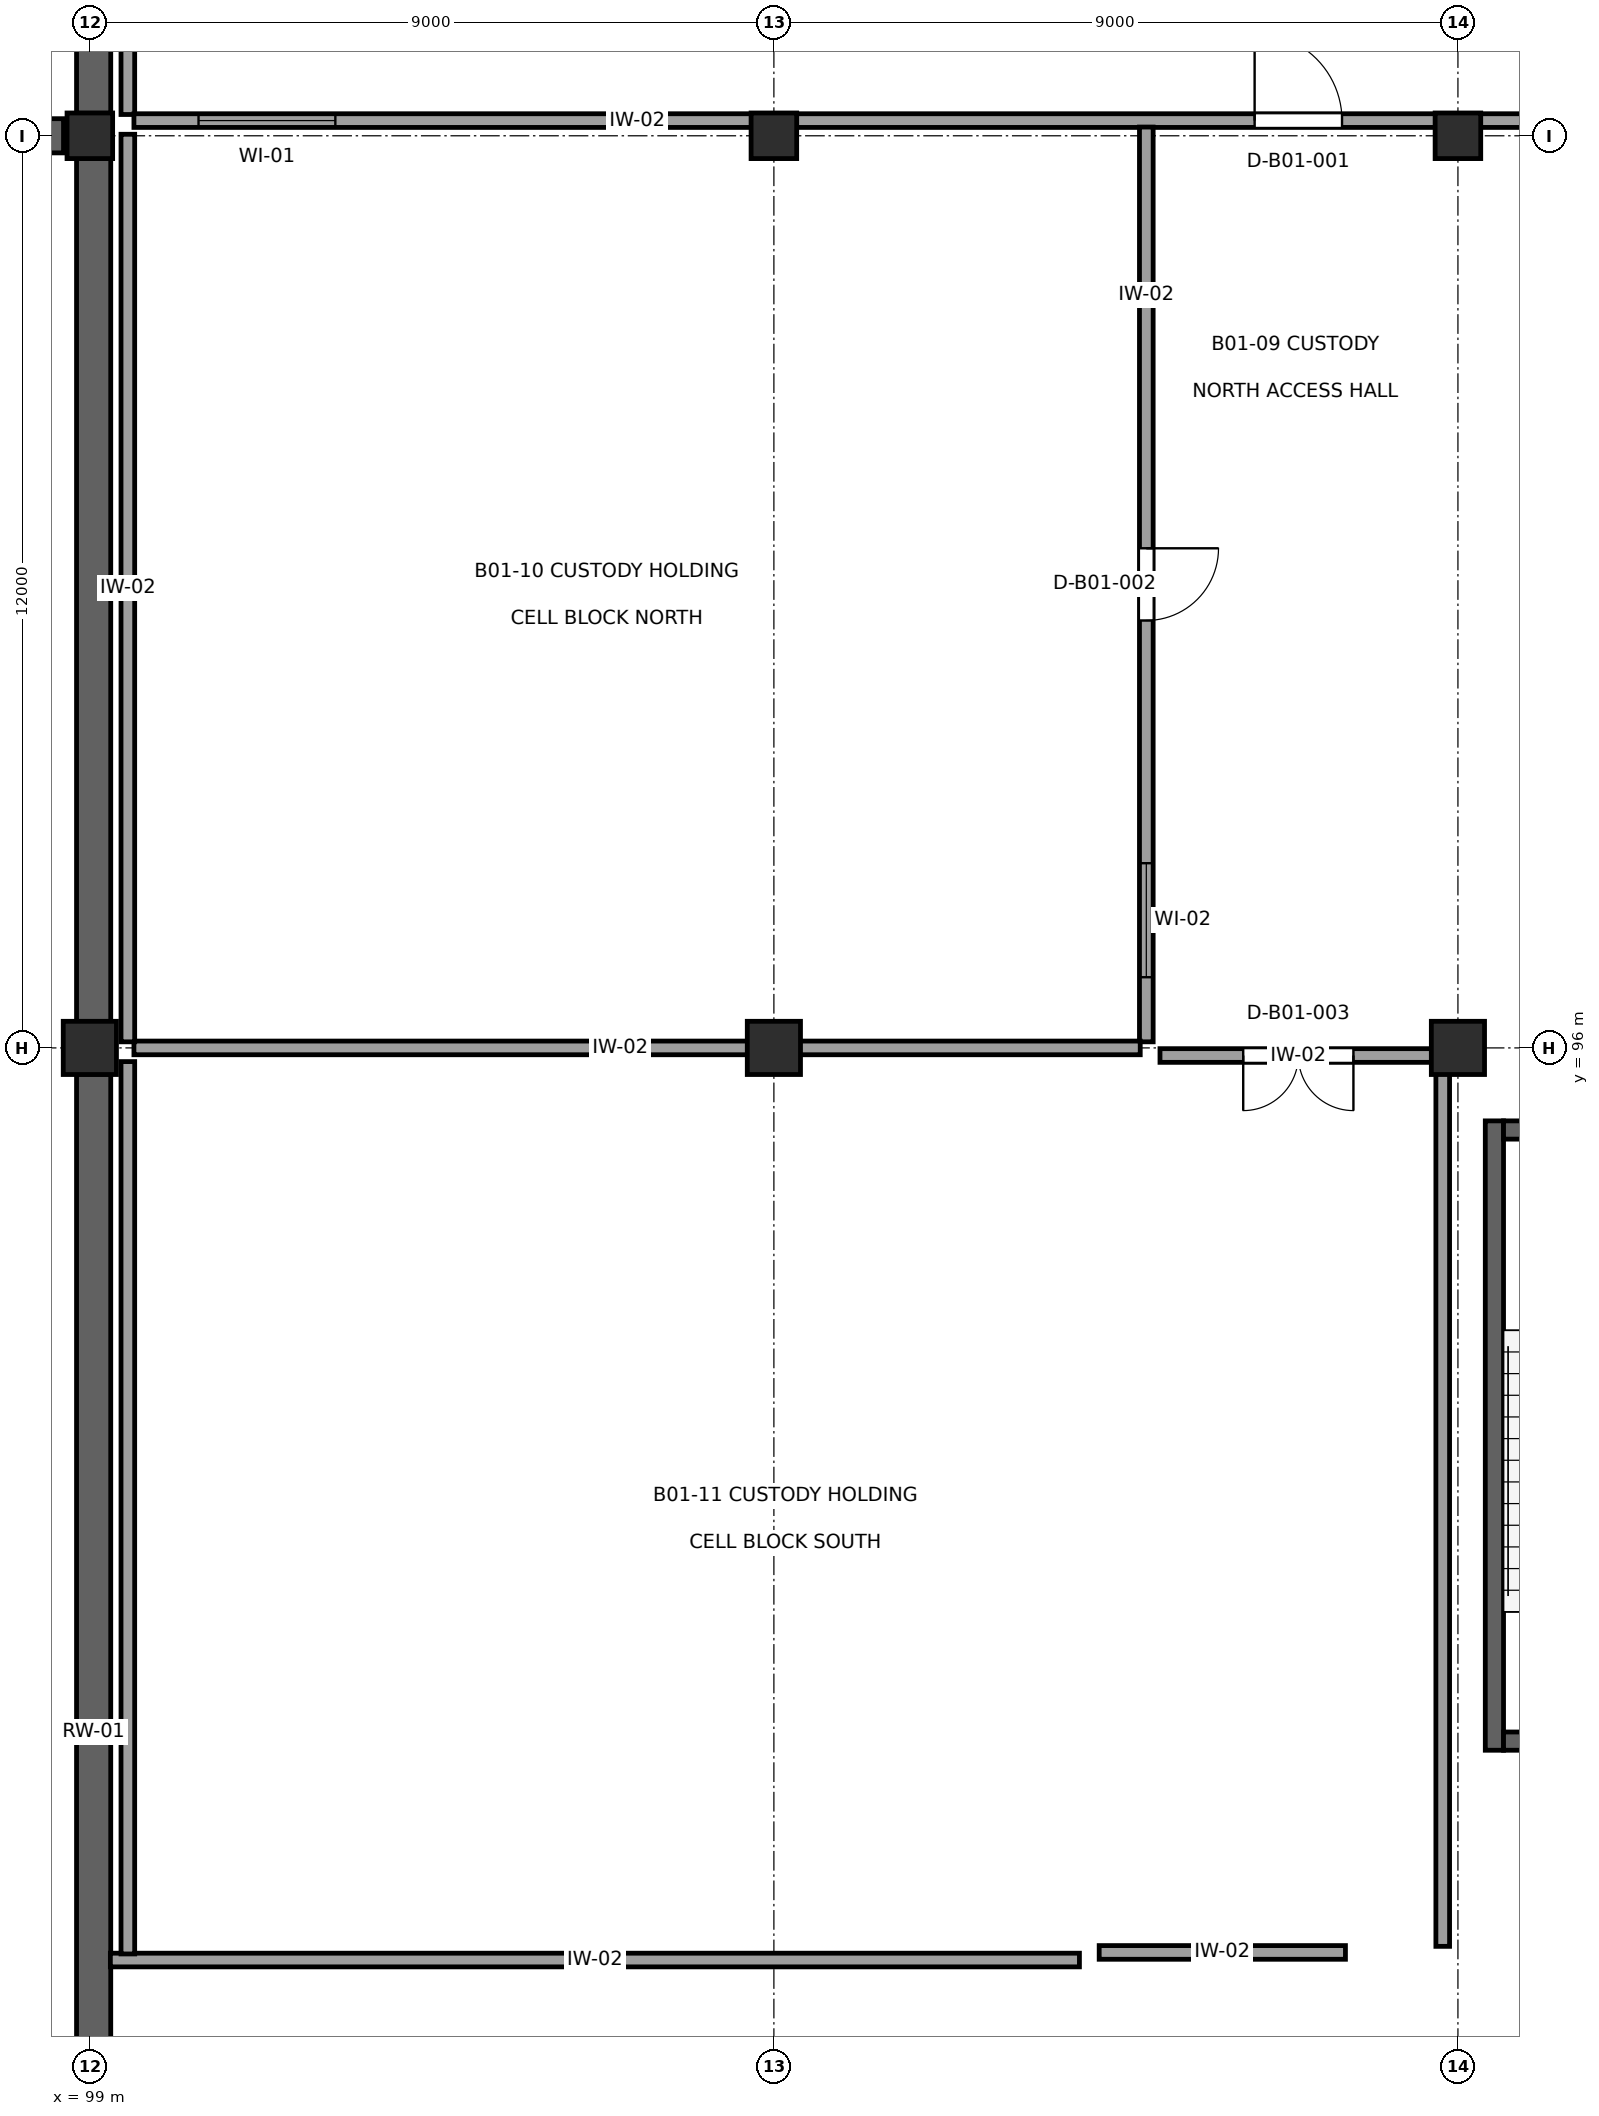
"""IFC4 building model, lengths in metres.
Left out: names, types, materials, properties, quantities, classifications, styles, units other than length and angle.
Written with IfcOpenShell. Run it as: python <this file> out.ifc"""

import sys

from ifc_helpers import new_model, si_unit, direction, frame, frame_2d, origin, origin_2d, place, context, subcontext, project, spatial, rectangle, extrude, element, fill, save


model = new_model("IFC4")
c1 = context("Model", 3, precision=1e-05, world=origin(), true_north=direction((0.0, 1.0)))
c2 = subcontext(c1, "Body", "Model", "MODEL_VIEW")
j1 = project(units=[si_unit("LENGTHUNIT", "METRE"), si_unit("PLANEANGLEUNIT", "RADIAN")], contexts=[c1])
p1 = place(None, origin())
s1 = spatial("IfcSite", under=j1, at=p1, CompositionType="ELEMENT")
p2 = place(p1, origin())
s2 = spatial("IfcBuilding", under=s1, at=p2, CompositionType="ELEMENT")
p3 = place(p2, frame((0.0, 0.0, -4.5)))
s3 = spatial("IfcBuildingStorey", under=s2, at=p3, CompositionType="ELEMENT", Elevation=-4.5)
p4 = place(p3, frame((99.0, 96.0, 0.0), z_axis=(0.0, 0.0, 1.0), x_axis=(1.0, 0.0, 0.0)))
e1 = element("IfcColumn", 1, at=p4, inside=s3, PredefinedType="COLUMN", context=c2, shape_type="SweptSolid", body=[
    extrude(rectangle(XDim=0.7, YDim=0.7, at=origin_2d()), origin(), (0.0, 0.0, 1.0), 4.5),
])
p5 = place(p3, frame((99.0, 108.0, 0.0), z_axis=(0.0, 0.0, 1.0), x_axis=(1.0, 0.0, 0.0)))
e2 = element("IfcColumn", 2, at=p5, inside=s3, PredefinedType="COLUMN", context=c2, shape_type="SweptSolid", body=[
    extrude(rectangle(XDim=0.6, YDim=0.6, at=origin_2d()), origin(), (0.0, 0.0, 1.0), 4.5),
])
p6 = place(p3, frame((108.0, 96.0, 0.0), z_axis=(0.0, 0.0, 1.0), x_axis=(1.0, 0.0, 0.0)))
e3 = element("IfcColumn", 3, at=p6, inside=s3, PredefinedType="COLUMN", context=c2, shape_type="SweptSolid", body=[
    extrude(rectangle(XDim=0.7, YDim=0.7, at=origin_2d()), origin(), (0.0, 0.0, 1.0), 4.5),
])
p7 = place(p3, frame((108.0, 108.0, 0.0), z_axis=(0.0, 0.0, 1.0), x_axis=(1.0, 0.0, 0.0)))
e4 = element("IfcColumn", 4, at=p7, inside=s3, PredefinedType="COLUMN", context=c2, shape_type="SweptSolid", body=[
    extrude(rectangle(XDim=0.6, YDim=0.6, at=origin_2d()), origin(), (0.0, 0.0, 1.0), 4.5),
])
p8 = place(p3, frame((117.0, 96.0, 0.0), z_axis=(0.0, 0.0, 1.0), x_axis=(1.0, 0.0, 0.0)))
e5 = element("IfcColumn", 5, at=p8, inside=s3, PredefinedType="COLUMN", context=c2, shape_type="SweptSolid", body=[
    extrude(rectangle(XDim=0.7, YDim=0.7, at=origin_2d()), origin(), (0.0, 0.0, 1.0), 4.5),
])
p9 = place(p3, frame((117.0, 108.0, 0.0), z_axis=(0.0, 0.0, 1.0), x_axis=(1.0, 0.0, 0.0)))
e6 = element("IfcColumn", 6, at=p9, inside=s3, PredefinedType="COLUMN", context=c2, shape_type="SweptSolid", body=[
    extrude(rectangle(XDim=0.6, YDim=0.6, at=origin_2d()), origin(), (0.0, 0.0, 1.0), 4.5),
])
p10 = place(p3, frame((99.05, 119.775, 0.0), z_axis=(0.0, 0.0, 1.0), x_axis=(0.0, -1.0, 0.0)))
e7 = element("IfcWall", 7, at=p10, inside=s3, PredefinedType="USERDEFINED", context=c2, shape_type="SweptSolid", body=[
    extrude(rectangle(XDim=11.479, YDim=0.45, at=frame_2d((5.74, 0.0))), origin(), (0.0, 0.0, 1.0), 4.32),
])
p11 = place(p3, frame((99.05, 107.704, 0.0), z_axis=(0.0, 0.0, 1.0), x_axis=(0.0, -1.0, 0.0)))
e8 = element("IfcWall", 8, at=p11, inside=s3, PredefinedType="USERDEFINED", context=c2, shape_type="SweptSolid", body=[
    extrude(rectangle(XDim=11.358, YDim=0.45, at=frame_2d((5.679, 0.0))), origin(), (0.0, 0.0, 1.0), 4.32),
])
p12 = place(p3, frame((99.05, 95.654, 0.0), z_axis=(0.0, 0.0, 1.0), x_axis=(0.0, -1.0, 0.0)))
e9 = element("IfcWall", 9, at=p12, inside=s3, PredefinedType="USERDEFINED", context=c2, shape_type="SweptSolid", body=[
    extrude(rectangle(XDim=17.308, YDim=0.45, at=frame_2d((8.654, 0.0))), origin(), (0.0, 0.0, 1.0), 4.32),
])
p13 = place(p3, frame((98.654, 108.0, 0.0), z_axis=(0.0, 0.0, 1.0), x_axis=(-1.0, 0.0, 0.0)))
e10 = element("IfcWall", 10, at=p13, inside=s3, PredefinedType="USERDEFINED", context=c2, shape_type="SweptSolid", body=[
    extrude(rectangle(XDim=8.358, YDim=0.45, at=frame_2d((4.179, 0.0))), origin(), (0.0, 0.0, 1.0), 4.32),
])
p14 = place(p3, frame((117.48, 86.76, 0.0), z_axis=(0.0, 0.0, 1.0), x_axis=(0.0, 1.0, 0.0)))
e11 = element("IfcWall", 11, at=p14, inside=s3, PredefinedType="SHEAR", context=c2, shape_type="SweptSolid", body=[
    extrude(rectangle(XDim=8.28, YDim=0.24, at=frame_2d((4.14, 0.0))), origin(), (0.0, 0.0, 1.0), 4.31),
])
for number, where, z_axis, x_axis in (
    (12, (117.6, 86.88, 0.0), (0.0, 0.0, 1.0), (1.0, 0.0, 0.0)),
    (13, (117.6, 94.92, 0.0), (0.0, 0.0, 1.0), (1.0, 0.0, 0.0)),
):
    element("IfcWall", number, at=place(p3, frame(where, z_axis=z_axis, x_axis=x_axis)), inside=s3, PredefinedType="SHEAR", context=c2, shape_type="SweptSolid", body=[
        extrude(rectangle(XDim=3.7, YDim=0.24, at=frame_2d((1.85, 0.0))), origin(), (0.0, 0.0, 1.0), 4.31),
    ])
p15 = place(p3, frame((99.5, 108.28, 0.0), z_axis=(0.0, 0.0, 1.0), x_axis=(0.0, 1.0, 0.0)))
e14 = element("IfcWall", 14, at=p15, inside=s3, PredefinedType="PARTITIONING", context=c2, shape_type="SweptSolid", body=[
    extrude(rectangle(XDim=11.5, YDim=0.18, at=frame_2d((5.75, 0.0))), origin(), (0.0, 0.0, 1.0), 4.14),
])
p16 = place(p3, frame((125.42, 108.2, 0.0), z_axis=(0.0, 0.0, 1.0), x_axis=(-1.0, 0.0, 0.0)))
e15 = element("IfcWall", 15, at=p16, inside=s3, PredefinedType="PARTITIONING", context=c2, shape_type="SweptSolid", body=[
    extrude(rectangle(XDim=25.84, YDim=0.18, at=frame_2d((12.92, 0.0))), origin(), (0.0, 0.0, 1.0), 3.645),
])
p17 = place(p16, frame((9.945, 0.0, 0.0)))
e16 = element("IfcOpeningElement", 16, at=p17, cuts=e15, PredefinedType="OPENING", context=c2, shape_type="SweptSolid", body=[
    extrude(rectangle(XDim=1.15, YDim=2.15, at=frame_2d((0.575, 1.075))), frame((0.0, 0.105, 0.0), z_axis=(0.0, -1.0, 0.0), x_axis=(1.0, 0.0, 0.0)), (0.0, 0.0, 1.0), 0.21),
])
p18 = place(p16, frame((23.19, 0.0, 1.05)))
e17 = element("IfcOpeningElement", 17, at=p18, cuts=e15, PredefinedType="OPENING", context=c2, shape_type="SweptSolid", body=[
    extrude(rectangle(XDim=1.8, YDim=1.1, at=frame_2d((0.9, 0.55))), frame((0.0, 0.105, 0.0), z_axis=(0.0, -1.0, 0.0), x_axis=(1.0, 0.0, 0.0)), (0.0, 0.0, 1.0), 0.21),
])
p19 = place(p3, frame((112.9, 108.115, 0.0), z_axis=(0.0, 0.0, 1.0), x_axis=(0.0, -1.0, 0.0)))
e18 = element("IfcWall", 18, at=p19, inside=s3, PredefinedType="PARTITIONING", context=c2, shape_type="SweptSolid", body=[
    extrude(rectangle(XDim=12.035, YDim=0.18, at=frame_2d((6.018, 0.0))), origin(), (0.0, 0.0, 1.0), 4.14),
])
p20 = place(p19, frame((5.542, 0.0, 0.0)))
e19 = element("IfcOpeningElement", 19, at=p20, cuts=e18, PredefinedType="OPENING", context=c2, shape_type="SweptSolid", body=[
    extrude(rectangle(XDim=0.95, YDim=2.1, at=frame_2d((0.475, 1.05))), frame((0.0, 0.105, 0.0), z_axis=(0.0, -1.0, 0.0), x_axis=(1.0, 0.0, 0.0)), (0.0, 0.0, 1.0), 0.21),
])
p21 = place(p19, frame((9.685, 0.0, 1.05)))
e20 = element("IfcOpeningElement", 20, at=p21, cuts=e18, PredefinedType="OPENING", context=c2, shape_type="SweptSolid", body=[
    extrude(rectangle(XDim=1.5, YDim=1.1, at=frame_2d((0.75, 0.55))), frame((0.0, 0.105, 0.0), z_axis=(0.0, -1.0, 0.0), x_axis=(1.0, 0.0, 0.0)), (0.0, 0.0, 1.0), 0.21),
])
p22 = place(p3, frame((112.82, 96.0, 0.0), z_axis=(0.0, 0.0, 1.0), x_axis=(-1.0, 0.0, 0.0)))
e21 = element("IfcWall", 21, at=p22, inside=s3, PredefinedType="PARTITIONING", context=c2, shape_type="SweptSolid", body=[
    extrude(rectangle(XDim=13.24, YDim=0.18, at=frame_2d((6.62, 0.0))), origin(), (0.0, 0.0, 1.0), 3.755),
])
p23 = place(p3, frame((99.5, 96.08, 0.0), z_axis=(0.0, 0.0, 1.0), x_axis=(0.0, 1.0, 0.0)))
e22 = element("IfcWall", 22, at=p23, inside=s3, PredefinedType="PARTITIONING", context=c2, shape_type="SweptSolid", body=[
    extrude(rectangle(XDim=11.94, YDim=0.18, at=frame_2d((5.97, 0.0))), origin(), (0.0, 0.0, 1.0), 3.835),
])
p24 = place(p3, frame((115.52, 84.1, 0.0), z_axis=(0.0, 0.0, 1.0), x_axis=(-1.0, 0.0, 0.0)))
e23 = element("IfcWall", 23, at=p24, inside=s3, PredefinedType="PARTITIONING", context=c2, shape_type="SweptSolid", body=[
    extrude(rectangle(XDim=3.24, YDim=0.18, at=frame_2d((1.62, 0.0))), origin(), (0.0, 0.0, 1.0), 4.14),
])
p25 = place(p3, frame((112.02, 84.0, 0.0), z_axis=(0.0, 0.0, 1.0), x_axis=(-1.0, 0.0, 0.0)))
e24 = element("IfcWall", 24, at=p25, inside=s3, PredefinedType="PARTITIONING", context=c2, shape_type="SweptSolid", body=[
    extrude(rectangle(XDim=12.75, YDim=0.18, at=frame_2d((6.375, 0.0))), origin(), (0.0, 0.0, 1.0), 4.14),
])
p26 = place(p3, frame((99.5, 84.08, 0.0), z_axis=(0.0, 0.0, 1.0), x_axis=(0.0, 1.0, 0.0)))
e25 = element("IfcWall", 25, at=p26, inside=s3, PredefinedType="PARTITIONING", context=c2, shape_type="SweptSolid", body=[
    extrude(rectangle(XDim=11.74, YDim=0.18, at=frame_2d((5.87, 0.0))), origin(), (0.0, 0.0, 1.0), 3.715),
])
p27 = place(p3, frame((113.08, 95.9, 0.0), z_axis=(0.0, 0.0, 1.0), x_axis=(1.0, 0.0, 0.0)))
e26 = element("IfcWall", 26, at=p27, inside=s3, PredefinedType="PARTITIONING", context=c2, shape_type="SweptSolid", body=[
    extrude(rectangle(XDim=3.64, YDim=0.18, at=frame_2d((1.82, 0.0))), origin(), (0.0, 0.0, 1.0), 3.755),
])
p28 = place(p27, frame((1.095, 0.0, 0.0)))
e27 = element("IfcOpeningElement", 27, at=p28, cuts=e26, PredefinedType="OPENING", context=c2, shape_type="SweptSolid", body=[
    extrude(rectangle(XDim=1.45, YDim=2.3, at=frame_2d((0.725, 1.15))), frame((0.0, 0.105, 0.0), z_axis=(0.0, -1.0, 0.0), x_axis=(1.0, 0.0, 0.0)), (0.0, 0.0, 1.0), 0.21),
])
p29 = place(p3, frame((116.8, 95.82, 0.0), z_axis=(0.0, 0.0, 1.0), x_axis=(0.0, -1.0, 0.0)))
e28 = element("IfcWall", 28, at=p29, inside=s3, PredefinedType="PARTITIONING", context=c2, shape_type="SweptSolid", body=[
    extrude(rectangle(XDim=11.64, YDim=0.18, at=frame_2d((5.82, 0.0))), origin(), (0.0, 0.0, 1.0), 3.405),
])
p30 = place(p17, frame((1.15, 0.0, 0.0), z_axis=(0.0, 0.0, 1.0), x_axis=(-1.0, 0.0, 0.0)))
e29 = element("IfcDoor", 29, at=p30, inside=s3, OperationType="SINGLE_SWING_RIGHT", PredefinedType="DOOR", context=c2, shape_type="SweptSolid", body=[
    extrude(rectangle(XDim=1.15, YDim=2.15, at=frame_2d((0.575, 1.075))), frame((0.0, 0.025, 0.0), z_axis=(0.0, -1.0, 0.0), x_axis=(1.0, 0.0, 0.0)), (0.0, 0.0, 1.0), 0.05),
])
fill(e16, e29)
p31 = place(p18, origin())
e30 = element("IfcWindow", 30, at=p31, inside=s3, PartitioningType="SINGLE_PANEL", PredefinedType="WINDOW", context=c2, shape_type="SweptSolid", body=[
    extrude(rectangle(XDim=1.8, YDim=1.1, at=frame_2d((0.9, 0.55))), frame((0.0, 0.03, 0.0), z_axis=(0.0, -1.0, 0.0), x_axis=(1.0, 0.0, 0.0)), (0.0, 0.0, 1.0), 0.06),
])
fill(e17, e30)
p32 = place(p20, origin())
e31 = element("IfcDoor", 31, at=p32, inside=s3, OperationType="SINGLE_SWING_LEFT", PredefinedType="DOOR", context=c2, shape_type="SweptSolid", body=[
    extrude(rectangle(XDim=0.95, YDim=2.1, at=frame_2d((0.475, 1.05))), frame((0.0, 0.025, 0.0), z_axis=(0.0, -1.0, 0.0), x_axis=(1.0, 0.0, 0.0)), (0.0, 0.0, 1.0), 0.05),
])
fill(e19, e31)
p33 = place(p21, origin())
e32 = element("IfcWindow", 32, at=p33, inside=s3, PartitioningType="SINGLE_PANEL", PredefinedType="WINDOW", context=c2, shape_type="SweptSolid", body=[
    extrude(rectangle(XDim=1.5, YDim=1.1, at=frame_2d((0.75, 0.55))), frame((0.0, 0.03, 0.0), z_axis=(0.0, -1.0, 0.0), x_axis=(1.0, 0.0, 0.0)), (0.0, 0.0, 1.0), 0.06),
])
fill(e20, e32)
p34 = place(p28, frame((1.45, 0.0, 0.0), z_axis=(0.0, 0.0, 1.0), x_axis=(-1.0, 0.0, 0.0)))
e33 = element("IfcDoor", 33, at=p34, inside=s3, OperationType="DOUBLE_DOOR_SINGLE_SWING", PredefinedType="DOOR", context=c2, shape_type="SweptSolid", body=[
    extrude(rectangle(XDim=1.45, YDim=2.3, at=frame_2d((0.725, 1.15))), frame((0.0, 0.025, 0.0), z_axis=(0.0, -1.0, 0.0), x_axis=(1.0, 0.0, 0.0)), (0.0, 0.0, 1.0), 0.05),
])
fill(e27, e33)
save(model, sys.argv[1])
